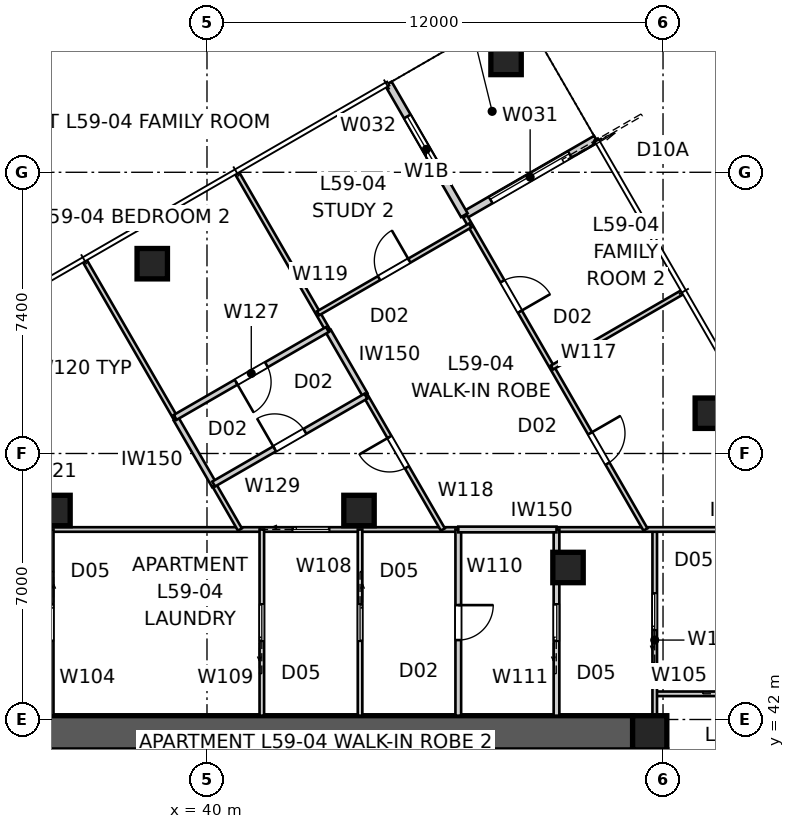
"""IFC4 building model, lengths in metres.
Left out: names, types, materials, properties, quantities, classifications, styles, units other than length and angle.
Written with IfcOpenShell. Run it as: python <this file> out.ifc"""

import sys

from ifc_helpers import new_model, si_unit, direction, frame, frame_2d, origin, origin_2d, place, context, subcontext, project, spatial, polyline, rectangle, outline, extrude, element, fill, save


model = new_model("IFC4")
c1 = context("Model", 3, precision=1e-05, world=origin(), true_north=direction((0.0, 1.0)))
c2 = subcontext(c1, "Body", "Model", "MODEL_VIEW")
j1 = project(units=[si_unit("LENGTHUNIT", "METRE"), si_unit("PLANEANGLEUNIT", "RADIAN")], contexts=[c1])
p1 = place(None, origin())
s1 = spatial("IfcSite", under=j1, at=p1, CompositionType="ELEMENT")
p2 = place(p1, origin())
s2 = spatial("IfcBuilding", under=s1, at=p2, CompositionType="ELEMENT")
p3 = place(p2, frame((0.0, 0.0, 215.0)))
s3 = spatial("IfcBuildingStorey", under=s2, at=p3, CompositionType="ELEMENT", Elevation=215.0)
p4 = place(p3, frame((28.8, 41.65, 0.0), z_axis=(0.0, 0.0, 1.0), x_axis=(1.0, 0.0, 0.0)))
e1 = element("IfcWall", 1, at=p4, inside=s3, PredefinedType="SHEAR", context=c2, shape_type="SweptSolid", body=[
    extrude(outline(polyline([(0.0, -0.45), (22.4, -0.45), (22.4, -0.025), (22.85, -0.025), (22.85, 0.025), (22.4, 0.025), (22.4, 0.45), (0.0, 0.45), (0.0, 0.025), (-0.45, 0.025), (-0.45, -0.025), (0.0, -0.025), (0.0, -0.45)])), origin(), (0.0, 0.0, 1.0), 3.4),
])
p5 = place(p3, frame((51.65, 18.8, 0.0), z_axis=(0.0, 0.0, 1.0), x_axis=(0.0, 1.0, 0.0)))
e2 = element("IfcWall", 2, at=p5, inside=s3, PredefinedType="SHEAR", context=c2, shape_type="SweptSolid", body=[
    extrude(outline(polyline([(0.0, -0.45), (22.4, -0.45), (22.4, -0.025), (22.85, -0.025), (22.85, 0.025), (22.4, 0.025), (22.4, 0.45), (0.0, 0.45), (0.0, 0.025), (-0.45, 0.025), (-0.45, -0.025), (0.0, -0.025), (0.0, -0.45)])), origin(), (0.0, 0.0, 1.0), 3.4),
])
p6 = place(p5, frame((11.14, 0.0, 0.0)))
e3 = element("IfcOpeningElement", 3, at=p6, cuts=e2, PredefinedType="OPENING", context=c2, shape_type="SweptSolid", body=[
    extrude(rectangle(XDim=1.02, YDim=2.4, at=frame_2d((0.51, 1.2))), frame((0.0, 0.46, 0.0), z_axis=(0.0, -1.0, 0.0), x_axis=(1.0, 0.0, 0.0)), (0.0, 0.0, 1.0), 0.92),
])
p7 = place(p3, frame((51.65, 41.65, 0.0), z_axis=(0.0, 0.0, 1.0), x_axis=(1.0, 0.0, 0.0)))
e4 = element("IfcColumn", 4, at=p7, inside=s3, PredefinedType="COLUMN", context=c2, shape_type="SweptSolid", body=[
    extrude(rectangle(XDim=0.9, YDim=0.9, at=origin_2d()), origin(), (0.0, 0.0, 1.0), 3.4),
])
for number, where, z_axis, x_axis in (
    (5, (53.245, 50.06, 0.0), (0.0, 0.0, 1.0), (1.0, 0.0, 0.0)),
    (6, (47.87, 59.37, 0.0), (0.0, 0.0, 1.0), (1.0, 0.0, 0.0)),
    (7, (38.56, 53.995, 0.0), (0.0, 0.0, 1.0), (1.0, 0.0, 0.0)),
    (8, (49.5, 46.0, 0.0), (0.0, 0.0, 1.0), (1.0, 0.0, 0.0)),
    (9, (44.0, 47.5, 0.0), (0.0, 0.0, 1.0), (1.0, 0.0, 0.0)),
    (10, (36.0, 47.5, 0.0), (0.0, 0.0, 1.0), (1.0, 0.0, 0.0)),
):
    element("IfcColumn", number, at=place(p3, frame(where, z_axis=z_axis, x_axis=x_axis)), inside=s3, PredefinedType="COLUMN", context=c2, shape_type="SweptSolid", body=[
        extrude(rectangle(XDim=0.8, YDim=0.8, at=origin_2d()), origin(), (0.0, 0.0, 1.0), 3.4),
    ])
p8 = place(p3, frame((50.236, 57.271, 0.0), z_axis=(0.0, 0.0, 1.0), x_axis=(-0.866026010844, -0.49999894854, 0.0)))
e11 = element("IfcWall", 11, at=p8, inside=s3, PredefinedType="SOLIDWALL", context=c2, shape_type="SweptSolid", body=[
    extrude(rectangle(XDim=4.0, YDim=0.2, at=frame_2d((2.0, 0.0))), origin(), (0.0, 0.0, 1.0), 3.25),
])
p9 = place(p8, frame((0.8, 0.0, 0.0)))
e12 = element("IfcOpeningElement", 12, at=p9, cuts=e11, PredefinedType="OPENING", context=c2, shape_type="SweptSolid", body=[
    extrude(rectangle(XDim=2.4, YDim=2.1, at=frame_2d((1.2, 1.05))), frame((0.0, 0.11, 0.0), z_axis=(0.0, -1.0, 0.0), x_axis=(1.0, 0.0, 0.0)), (0.0, 0.0, 1.0), 0.22),
])
p10 = place(p3, frame((46.771, 55.271, 0.0), z_axis=(0.0, 0.0, 1.0), x_axis=(-0.49999894854, 0.866026010844, 0.0)))
e13 = element("IfcWall", 13, at=p10, inside=s3, PredefinedType="SOLIDWALL", context=c2, shape_type="SweptSolid", body=[
    extrude(rectangle(XDim=4.0, YDim=0.2, at=frame_2d((2.0, 0.0))), origin(), (0.0, 0.0, 1.0), 3.25),
])
p11 = place(p10, frame((1.0, 0.0, 0.45)))
e14 = element("IfcOpeningElement", 14, at=p11, cuts=e13, PredefinedType="OPENING", context=c2, shape_type="SweptSolid", body=[
    extrude(rectangle(XDim=2.0, YDim=1.8, at=frame_2d((1.0, 0.9))), frame((0.0, 0.11, 0.0), z_axis=(0.0, -1.0, 0.0), x_axis=(1.0, 0.0, 0.0)), (0.0, 0.0, 1.0), 0.22),
])
p12 = place(p3, frame((59.486, 41.25, 0.0), z_axis=(0.0, 0.0, 1.0), x_axis=(-0.866020489494, -0.500008511703, 0.0)))
e15 = element("IfcWall", 15, at=p12, inside=s3, PredefinedType="PARTITIONING", context=c2, shape_type="SweptSolid", body=[
    extrude(rectangle(XDim=8.496, YDim=0.25, at=frame_2d((4.248, 0.0))), origin(), (0.0, 0.0, 1.0), 3.25),
])
p13 = place(p3, frame((24.525, 47.0, 0.0), z_axis=(0.0, 0.0, 1.0), x_axis=(1.0, 0.0, 0.0)))
e16 = element("IfcWall", 16, at=p13, inside=s3, PredefinedType="PARTITIONING", context=c2, shape_type="SweptSolid", body=[
    extrude(rectangle(XDim=22.087, YDim=0.12, at=frame_2d((11.044, 0.0))), origin(), (0.0, 0.0, 1.0), 2.55),
])
p14 = place(p13, frame((1.928, 0.0, 0.0)))
e17 = element("IfcOpeningElement", 17, at=p14, cuts=e16, PredefinedType="OPENING", context=c2, shape_type="SweptSolid", body=[
    extrude(rectangle(XDim=0.92, YDim=2.34, at=frame_2d((0.46, 1.17))), frame((0.0, 0.07, 0.0), z_axis=(0.0, -1.0, 0.0), x_axis=(1.0, 0.0, 0.0)), (0.0, 0.0, 1.0), 0.14),
])
p15 = place(p13, frame((17.73, 0.0, 0.0)))
e18 = element("IfcOpeningElement", 18, at=p15, cuts=e16, PredefinedType="OPENING", context=c2, shape_type="SweptSolid", body=[
    extrude(rectangle(XDim=0.96, YDim=2.1, at=frame_2d((0.48, 1.05))), frame((0.0, 0.07, 0.0), z_axis=(0.0, -1.0, 0.0), x_axis=(1.0, 0.0, 0.0)), (0.0, 0.0, 1.0), 0.14),
])
p16 = place(p3, frame((35.901, 47.0, 0.0), z_axis=(0.0, 0.0, 1.0), x_axis=(0.0, -1.0, 0.0)))
e19 = element("IfcWall", 19, at=p16, inside=s3, PredefinedType="PARTITIONING", context=c2, shape_type="SweptSolid", body=[
    extrude(rectangle(XDim=4.9, YDim=0.12, at=frame_2d((2.45, 0.0))), origin(), (0.0, 0.0, 1.0), 3.25),
])
p17 = place(p16, frame((1.97, 0.0, 0.0)))
e20 = element("IfcOpeningElement", 20, at=p17, cuts=e19, PredefinedType="OPENING", context=c2, shape_type="SweptSolid", body=[
    extrude(rectangle(XDim=0.96, YDim=2.1, at=frame_2d((0.48, 1.05))), frame((0.0, 0.07, 0.0), z_axis=(0.0, -1.0, 0.0), x_axis=(1.0, 0.0, 0.0)), (0.0, 0.0, 1.0), 0.14),
])
p18 = place(p3, frame((51.782, 42.676, 0.0), z_axis=(0.0, 0.0, 1.0), x_axis=(1.0, 0.0, 0.0)))
e21 = element("IfcWall", 21, at=p18, inside=s3, PredefinedType="PARTITIONING", context=c2, shape_type="SweptSolid", body=[
    extrude(rectangle(XDim=5.218, YDim=0.12, at=frame_2d((2.609, 0.0))), origin(), (0.0, 0.0, 1.0), 3.25),
])
p19 = place(p18, frame((2.129, 0.0, 0.0)))
e22 = element("IfcOpeningElement", 22, at=p19, cuts=e21, PredefinedType="OPENING", context=c2, shape_type="SweptSolid", body=[
    extrude(rectangle(XDim=0.96, YDim=2.1, at=frame_2d((0.48, 1.05))), frame((0.0, 0.07, 0.0), z_axis=(0.0, -1.0, 0.0), x_axis=(1.0, 0.0, 0.0)), (0.0, 0.0, 1.0), 0.14),
])
p20 = place(p3, frame((51.782, 41.18, 0.0), z_axis=(0.0, 0.0, 1.0), x_axis=(0.0, 1.0, 0.0)))
e23 = element("IfcWall", 23, at=p20, inside=s3, PredefinedType="PARTITIONING", context=c2, shape_type="SweptSolid", body=[
    extrude(rectangle(XDim=5.82, YDim=0.12, at=frame_2d((2.91, 0.0))), origin(), (0.0, 0.0, 1.0), 3.25),
])
p21 = place(p20, frame((3.178, 0.0, 0.0)))
e24 = element("IfcOpeningElement", 24, at=p21, cuts=e23, PredefinedType="OPENING", context=c2, shape_type="SweptSolid", body=[
    extrude(rectangle(XDim=0.96, YDim=2.1, at=frame_2d((0.48, 1.05))), frame((0.0, 0.07, 0.0), z_axis=(0.0, -1.0, 0.0), x_axis=(1.0, 0.0, 0.0)), (0.0, 0.0, 1.0), 0.14),
])
p22 = place(p3, frame((49.197, 47.0, 0.0), z_axis=(0.0, 0.0, 1.0), x_axis=(1.0, 0.0, 0.0)))
e25 = element("IfcWall", 25, at=p22, inside=s3, PredefinedType="PARTITIONING", context=c2, shape_type="SweptSolid", body=[
    extrude(rectangle(XDim=6.923, YDim=0.12, at=frame_2d((3.461, 0.0))), origin(), (0.0, 0.0, 1.0), 3.25),
])
p23 = place(p3, frame((44.028, 47.0, 0.0), z_axis=(0.0, 0.0, 1.0), x_axis=(0.0, -1.0, 0.0)))
e26 = element("IfcWall", 26, at=p23, inside=s3, PredefinedType="PARTITIONING", context=c2, shape_type="SweptSolid", body=[
    extrude(rectangle(XDim=4.9, YDim=0.12, at=frame_2d((2.45, 0.0))), origin(), (0.0, 0.0, 1.0), 3.25),
])
p24 = place(p23, frame((1.97, 0.0, 0.0)))
e27 = element("IfcOpeningElement", 27, at=p24, cuts=e26, PredefinedType="OPENING", context=c2, shape_type="SweptSolid", body=[
    extrude(rectangle(XDim=0.96, YDim=2.1, at=frame_2d((0.48, 1.05))), frame((0.0, 0.07, 0.0), z_axis=(0.0, -1.0, 0.0), x_axis=(1.0, 0.0, 0.0)), (0.0, 0.0, 1.0), 0.14),
])
p25 = place(p3, frame((41.443, 42.1, 0.0), z_axis=(0.0, 0.0, 1.0), x_axis=(0.0, 1.0, 0.0)))
e28 = element("IfcWall", 28, at=p25, inside=s3, PredefinedType="PARTITIONING", context=c2, shape_type="SweptSolid", body=[
    extrude(rectangle(XDim=4.9, YDim=0.12, at=frame_2d((2.45, 0.0))), origin(), (0.0, 0.0, 1.0), 3.25),
])
p26 = place(p25, frame((1.97, 0.0, 0.0)))
e29 = element("IfcOpeningElement", 29, at=p26, cuts=e28, PredefinedType="OPENING", context=c2, shape_type="SweptSolid", body=[
    extrude(rectangle(XDim=0.96, YDim=2.1, at=frame_2d((0.48, 1.05))), frame((0.0, 0.07, 0.0), z_axis=(0.0, -1.0, 0.0), x_axis=(1.0, 0.0, 0.0)), (0.0, 0.0, 1.0), 0.14),
])
p27 = place(p3, frame((46.612, 47.0, 0.0), z_axis=(0.0, 0.0, 1.0), x_axis=(0.0, -1.0, 0.0)))
e30 = element("IfcWall", 30, at=p27, inside=s3, PredefinedType="SOLIDWALL", context=c2, shape_type="SweptSolid", body=[
    extrude(rectangle(XDim=4.9, YDim=0.15, at=frame_2d((2.45, 0.0))), origin(), (0.0, 0.0, 1.0), 3.25),
])
p28 = place(p27, frame((1.99, 0.0, 0.0)))
e31 = element("IfcOpeningElement", 31, at=p28, cuts=e30, PredefinedType="OPENING", context=c2, shape_type="SweptSolid", body=[
    extrude(rectangle(XDim=0.92, YDim=2.34, at=frame_2d((0.46, 1.17))), frame((0.0, 0.085, 0.0), z_axis=(0.0, -1.0, 0.0), x_axis=(1.0, 0.0, 0.0)), (0.0, 0.0, 1.0), 0.17),
])
p29 = place(p3, frame((49.197, 42.1, 0.0), z_axis=(0.0, 0.0, 1.0), x_axis=(0.0, 1.0, 0.0)))
e32 = element("IfcWall", 32, at=p29, inside=s3, PredefinedType="SOLIDWALL", context=c2, shape_type="SweptSolid", body=[
    extrude(rectangle(XDim=4.9, YDim=0.15, at=frame_2d((2.45, 0.0))), origin(), (0.0, 0.0, 1.0), 3.25),
])
p30 = place(p29, frame((1.97, 0.0, 0.0)))
e33 = element("IfcOpeningElement", 33, at=p30, cuts=e32, PredefinedType="OPENING", context=c2, shape_type="SweptSolid", body=[
    extrude(rectangle(XDim=0.96, YDim=2.1, at=frame_2d((0.48, 1.05))), frame((0.0, 0.085, 0.0), z_axis=(0.0, -1.0, 0.0), x_axis=(1.0, 0.0, 0.0)), (0.0, 0.0, 1.0), 0.17),
])
p31 = place(p3, frame((46.612, 47.0, 0.0), z_axis=(0.0, 0.0, 1.0), x_axis=(1.0, 0.0, 0.0)))
e34 = element("IfcWall", 34, at=p31, inside=s3, PredefinedType="SOLIDWALL", context=c2, shape_type="SweptSolid", body=[
    extrude(rectangle(XDim=2.585, YDim=0.15, at=frame_2d((1.292, 0.0))), origin(), (0.0, 0.0, 1.0), 3.25),
])
p32 = place(p3, frame((43.193, 52.219, 0.0), z_axis=(0.0, 0.0, 1.0), x_axis=(-0.50000634465, 0.866021740668, 0.0)))
e35 = element("IfcWall", 35, at=p32, inside=s3, PredefinedType="PARTITIONING", context=c2, shape_type="SweptSolid", body=[
    extrude(rectangle(XDim=4.814, YDim=0.12, at=frame_2d((2.407, 0.0))), origin(), (0.0, 0.0, 1.0), 3.25),
])
p33 = place(p3, frame((46.792, 55.237, 0.0), z_axis=(0.0, 0.0, 1.0), x_axis=(0.49923620881, -0.866465929978, 0.0)))
e36 = element("IfcWall", 36, at=p33, inside=s3, PredefinedType="PARTITIONING", context=c2, shape_type="SweptSolid", body=[
    extrude(rectangle(XDim=9.506, YDim=0.12, at=frame_2d((4.753, 0.0))), origin(), (0.0, 0.0, 1.0), 3.25),
])
p34 = place(p33, frame((6.586, 0.0, 0.0)))
e37 = element("IfcOpeningElement", 37, at=p34, cuts=e36, PredefinedType="OPENING", context=c2, shape_type="SweptSolid", body=[
    extrude(rectangle(XDim=0.92, YDim=2.34, at=frame_2d((0.46, 1.17))), frame((0.0, 0.07, 0.0), z_axis=(0.0, -1.0, 0.0), x_axis=(1.0, 0.0, 0.0)), (0.0, 0.0, 1.0), 0.14),
])
p35 = place(p33, frame((1.969, 0.0, 0.0)))
e38 = element("IfcOpeningElement", 38, at=p35, cuts=e36, PredefinedType="OPENING", context=c2, shape_type="SweptSolid", body=[
    extrude(rectangle(XDim=0.92, YDim=2.34, at=frame_2d((0.46, 1.17))), frame((0.0, 0.07, 0.0), z_axis=(0.0, -1.0, 0.0), x_axis=(1.0, 0.0, 0.0)), (0.0, 0.0, 1.0), 0.14),
])
p36 = place(p3, frame((46.207, 47.0, 0.0), z_axis=(0.0, 0.0, 1.0), x_axis=(-0.499986975689, 0.866032923243, 0.0)))
e39 = element("IfcWall", 39, at=p36, inside=s3, PredefinedType="PARTITIONING", context=c2, shape_type="SweptSolid", body=[
    extrude(rectangle(XDim=4.101, YDim=0.12, at=frame_2d((2.051, 0.0))), origin(), (0.0, 0.0, 1.0), 3.25),
])
p37 = place(p36, frame((1.891, 0.0, 0.0)))
e40 = element("IfcOpeningElement", 40, at=p37, cuts=e39, PredefinedType="OPENING", context=c2, shape_type="SweptSolid", body=[
    extrude(rectangle(XDim=0.92, YDim=2.34, at=frame_2d((0.46, 1.17))), frame((0.0, 0.07, 0.0), z_axis=(0.0, -1.0, 0.0), x_axis=(1.0, 0.0, 0.0)), (0.0, 0.0, 1.0), 0.14),
])
p38 = place(p3, frame((42.922, 52.688, 0.0), z_axis=(0.0, 0.0, 1.0), x_axis=(0.866025598446, 0.499999662836, 0.0)))
e41 = element("IfcWall", 41, at=p38, inside=s3, PredefinedType="PARTITIONING", context=c2, shape_type="SweptSolid", body=[
    extrude(rectangle(XDim=4.625, YDim=0.12, at=frame_2d((2.312, 0.0))), origin(), (0.0, 0.0, 1.0), 3.25),
])
p39 = place(p38, frame((1.853, 0.0, 0.0)))
e42 = element("IfcOpeningElement", 42, at=p39, cuts=e41, PredefinedType="OPENING", context=c2, shape_type="SweptSolid", body=[
    extrude(rectangle(XDim=0.92, YDim=2.34, at=frame_2d((0.46, 1.17))), frame((0.0, 0.07, 0.0), z_axis=(0.0, -1.0, 0.0), x_axis=(1.0, 0.0, 0.0)), (0.0, 0.0, 1.0), 0.14),
])
p40 = place(p3, frame((44.156, 50.552, 0.0), z_axis=(0.0, 0.0, 1.0), x_axis=(-0.50001143954, 0.866018799062, 0.0)))
e43 = element("IfcWall", 43, at=p40, inside=s3, PredefinedType="SOLIDWALL", context=c2, shape_type="SweptSolid", body=[
    extrude(rectangle(XDim=1.926, YDim=0.15, at=frame_2d((0.963, 0.0))), origin(), (0.0, 0.0, 1.0), 3.25),
])
p41 = place(p3, frame((36.781, 54.076, 0.0), z_axis=(0.0, 0.0, 1.0), x_axis=(0.50000634465, -0.866021740668, 0.0)))
e44 = element("IfcWall", 44, at=p41, inside=s3, PredefinedType="PARTITIONING", context=c2, shape_type="SweptSolid", body=[
    extrude(rectangle(XDim=4.814, YDim=0.12, at=frame_2d((2.407, 0.0))), origin(), (0.0, 0.0, 1.0), 3.25),
])
p42 = place(p3, frame((40.2, 48.153, 0.0), z_axis=(0.0, 0.0, 1.0), x_axis=(0.500045314201, -0.865999240038, 0.0)))
e45 = element("IfcWall", 45, at=p42, inside=s3, PredefinedType="PARTITIONING", context=c2, shape_type="SweptSolid", body=[
    extrude(rectangle(XDim=1.331, YDim=0.12, at=frame_2d((0.666, 0.0))), origin(), (0.0, 0.0, 1.0), 3.25),
])
p43 = place(p3, frame((39.188, 49.907, 0.0), z_axis=(0.0, 0.0, 1.0), x_axis=(0.499924156672, -0.866069187523, 0.0)))
e46 = element("IfcWall", 46, at=p43, inside=s3, PredefinedType="SOLIDWALL", context=c2, shape_type="SweptSolid", body=[
    extrude(rectangle(XDim=2.026, YDim=0.15, at=frame_2d((1.013, 0.0))), origin(), (0.0, 0.0, 1.0), 3.25),
])
p44 = place(p3, frame((43.168, 52.263, 0.0), z_axis=(0.0, 0.0, 1.0), x_axis=(-0.866025598446, -0.499999662836, 0.0)))
e47 = element("IfcWall", 47, at=p44, inside=s3, PredefinedType="SOLIDWALL", context=c2, shape_type="SweptSolid", body=[
    extrude(rectangle(XDim=4.625, YDim=0.15, at=frame_2d((2.312, 0.0))), origin(), (0.0, 0.0, 1.0), 3.25),
])
p45 = place(p44, frame((1.853, 0.0, 0.0)))
e48 = element("IfcOpeningElement", 48, at=p45, cuts=e47, PredefinedType="OPENING", context=c2, shape_type="SweptSolid", body=[
    extrude(rectangle(XDim=0.92, YDim=2.34, at=frame_2d((0.46, 1.17))), frame((0.0, 0.085, 0.0), z_axis=(0.0, -1.0, 0.0), x_axis=(1.0, 0.0, 0.0)), (0.0, 0.0, 1.0), 0.17),
])
p46 = place(p3, frame((49.077, 51.262, 0.0), z_axis=(0.0, 0.0, 1.0), x_axis=(0.865992964694, 0.500056181943, 0.0)))
e49 = element("IfcWall", 49, at=p46, inside=s3, PredefinedType="PARTITIONING", context=c2, shape_type="SweptSolid", body=[
    extrude(rectangle(XDim=3.968, YDim=0.12, at=frame_2d((1.984, 0.0))), origin(), (0.0, 0.0, 1.0), 3.25),
])
p47 = place(p3, frame((40.176, 48.196, 0.0), z_axis=(0.0, 0.0, 1.0), x_axis=(0.866025598446, 0.499999662836, 0.0)))
e50 = element("IfcWall", 50, at=p47, inside=s3, PredefinedType="SOLIDWALL", context=c2, shape_type="SweptSolid", body=[
    extrude(rectangle(XDim=4.625, YDim=0.15, at=frame_2d((2.312, 0.0))), origin(), (0.0, 0.0, 1.0), 3.25),
])
p48 = place(p47, frame((1.853, 0.0, 0.0)))
e51 = element("IfcOpeningElement", 51, at=p48, cuts=e50, PredefinedType="OPENING", context=c2, shape_type="SweptSolid", body=[
    extrude(rectangle(XDim=0.92, YDim=2.34, at=frame_2d((0.46, 1.17))), frame((0.0, 0.085, 0.0), z_axis=(0.0, -1.0, 0.0), x_axis=(1.0, 0.0, 0.0)), (0.0, 0.0, 1.0), 0.17),
])
p49 = place(p9, origin())
e52 = element("IfcDoor", 52, at=p49, inside=s3, OperationType="SLIDING_TO_LEFT", PredefinedType="DOOR", context=c2, shape_type="SweptSolid", body=[
    extrude(rectangle(XDim=2.4, YDim=2.1, at=frame_2d((1.2, 1.05))), frame((0.0, 0.025, 0.0), z_axis=(0.0, -1.0, 0.0), x_axis=(1.0, 0.0, 0.0)), (0.0, 0.0, 1.0), 0.05),
])
fill(e12, e52)
p50 = place(p11, origin())
e53 = element("IfcWindow", 53, at=p50, inside=s3, PartitioningType="SINGLE_PANEL", PredefinedType="WINDOW", context=c2, shape_type="SweptSolid", body=[
    extrude(rectangle(XDim=2.0, YDim=1.8, at=frame_2d((1.0, 0.9))), frame((0.0, 0.03, 0.0), z_axis=(0.0, -1.0, 0.0), x_axis=(1.0, 0.0, 0.0)), (0.0, 0.0, 1.0), 0.06),
])
fill(e14, e53)
p51 = place(p17, origin())
e54 = element("IfcDoor", 54, at=p51, inside=s3, OperationType="SLIDING_TO_LEFT", PredefinedType="DOOR", context=c2, shape_type="SweptSolid", body=[
    extrude(rectangle(XDim=0.96, YDim=2.1, at=frame_2d((0.48, 1.05))), frame((0.0, 0.025, 0.0), z_axis=(0.0, -1.0, 0.0), x_axis=(1.0, 0.0, 0.0)), (0.0, 0.0, 1.0), 0.05),
])
fill(e20, e54)
p52 = place(p26, origin())
e55 = element("IfcDoor", 55, at=p52, inside=s3, OperationType="SLIDING_TO_LEFT", PredefinedType="DOOR", context=c2, shape_type="SweptSolid", body=[
    extrude(rectangle(XDim=0.96, YDim=2.1, at=frame_2d((0.48, 1.05))), frame((0.0, 0.025, 0.0), z_axis=(0.0, -1.0, 0.0), x_axis=(1.0, 0.0, 0.0)), (0.0, 0.0, 1.0), 0.05),
])
fill(e29, e55)
p53 = place(p24, origin())
e56 = element("IfcDoor", 56, at=p53, inside=s3, OperationType="SLIDING_TO_LEFT", PredefinedType="DOOR", context=c2, shape_type="SweptSolid", body=[
    extrude(rectangle(XDim=0.96, YDim=2.1, at=frame_2d((0.48, 1.05))), frame((0.0, 0.025, 0.0), z_axis=(0.0, -1.0, 0.0), x_axis=(1.0, 0.0, 0.0)), (0.0, 0.0, 1.0), 0.05),
])
fill(e27, e56)
p54 = place(p15, origin())
e57 = element("IfcDoor", 57, at=p54, inside=s3, OperationType="SLIDING_TO_LEFT", PredefinedType="DOOR", context=c2, shape_type="SweptSolid", body=[
    extrude(rectangle(XDim=0.96, YDim=2.1, at=frame_2d((0.48, 1.05))), frame((0.0, 0.025, 0.0), z_axis=(0.0, -1.0, 0.0), x_axis=(1.0, 0.0, 0.0)), (0.0, 0.0, 1.0), 0.05),
])
fill(e18, e57)
p55 = place(p28, origin())
e58 = element("IfcDoor", 58, at=p55, inside=s3, OperationType="SINGLE_SWING_LEFT", PredefinedType="DOOR", context=c2, shape_type="SweptSolid", body=[
    extrude(rectangle(XDim=0.92, YDim=2.34, at=frame_2d((0.46, 1.17))), frame((0.0, 0.025, 0.0), z_axis=(0.0, -1.0, 0.0), x_axis=(1.0, 0.0, 0.0)), (0.0, 0.0, 1.0), 0.05),
])
fill(e31, e58)
p56 = place(p48, origin())
e59 = element("IfcDoor", 59, at=p56, inside=s3, OperationType="SINGLE_SWING_LEFT", PredefinedType="DOOR", context=c2, shape_type="SweptSolid", body=[
    extrude(rectangle(XDim=0.92, YDim=2.34, at=frame_2d((0.46, 1.17))), frame((0.0, 0.025, 0.0), z_axis=(0.0, -1.0, 0.0), x_axis=(1.0, 0.0, 0.0)), (0.0, 0.0, 1.0), 0.05),
])
fill(e51, e59)
p57 = place(p37, origin())
e60 = element("IfcDoor", 60, at=p57, inside=s3, OperationType="SINGLE_SWING_RIGHT", PredefinedType="DOOR", context=c2, shape_type="SweptSolid", body=[
    extrude(rectangle(XDim=0.92, YDim=2.34, at=frame_2d((0.46, 1.17))), frame((0.0, 0.025, 0.0), z_axis=(0.0, -1.0, 0.0), x_axis=(1.0, 0.0, 0.0)), (0.0, 0.0, 1.0), 0.05),
])
fill(e40, e60)
p58 = place(p30, origin())
e61 = element("IfcDoor", 61, at=p58, inside=s3, OperationType="SLIDING_TO_LEFT", PredefinedType="DOOR", context=c2, shape_type="SweptSolid", body=[
    extrude(rectangle(XDim=0.96, YDim=2.1, at=frame_2d((0.48, 1.05))), frame((0.0, 0.025, 0.0), z_axis=(0.0, -1.0, 0.0), x_axis=(1.0, 0.0, 0.0)), (0.0, 0.0, 1.0), 0.05),
])
fill(e33, e61)
p59 = place(p45, origin())
e62 = element("IfcDoor", 62, at=p59, inside=s3, OperationType="SINGLE_SWING_RIGHT", PredefinedType="DOOR", context=c2, shape_type="SweptSolid", body=[
    extrude(rectangle(XDim=0.92, YDim=2.34, at=frame_2d((0.46, 1.17))), frame((0.0, 0.025, 0.0), z_axis=(0.0, -1.0, 0.0), x_axis=(1.0, 0.0, 0.0)), (0.0, 0.0, 1.0), 0.05),
])
fill(e48, e62)
p60 = place(p34, origin())
e63 = element("IfcDoor", 63, at=p60, inside=s3, OperationType="SINGLE_SWING_LEFT", PredefinedType="DOOR", context=c2, shape_type="SweptSolid", body=[
    extrude(rectangle(XDim=0.92, YDim=2.34, at=frame_2d((0.46, 1.17))), frame((0.0, 0.025, 0.0), z_axis=(0.0, -1.0, 0.0), x_axis=(1.0, 0.0, 0.0)), (0.0, 0.0, 1.0), 0.05),
])
fill(e37, e63)
p61 = place(p39, origin())
e64 = element("IfcDoor", 64, at=p61, inside=s3, OperationType="SINGLE_SWING_RIGHT", PredefinedType="DOOR", context=c2, shape_type="SweptSolid", body=[
    extrude(rectangle(XDim=0.92, YDim=2.34, at=frame_2d((0.46, 1.17))), frame((0.0, 0.025, 0.0), z_axis=(0.0, -1.0, 0.0), x_axis=(1.0, 0.0, 0.0)), (0.0, 0.0, 1.0), 0.05),
])
fill(e42, e64)
p62 = place(p35, origin())
e65 = element("IfcDoor", 65, at=p62, inside=s3, OperationType="SINGLE_SWING_RIGHT", PredefinedType="DOOR", context=c2, shape_type="SweptSolid", body=[
    extrude(rectangle(XDim=0.92, YDim=2.34, at=frame_2d((0.46, 1.17))), frame((0.0, 0.025, 0.0), z_axis=(0.0, -1.0, 0.0), x_axis=(1.0, 0.0, 0.0)), (0.0, 0.0, 1.0), 0.05),
])
fill(e38, e65)
p63 = place(p21, origin())
e66 = element("IfcDoor", 66, at=p63, inside=s3, OperationType="SLIDING_TO_LEFT", PredefinedType="DOOR", context=c2, shape_type="SweptSolid", body=[
    extrude(rectangle(XDim=0.96, YDim=2.1, at=frame_2d((0.48, 1.05))), frame((0.0, 0.025, 0.0), z_axis=(0.0, -1.0, 0.0), x_axis=(1.0, 0.0, 0.0)), (0.0, 0.0, 1.0), 0.05),
])
fill(e24, e66)
save(model, sys.argv[1])
